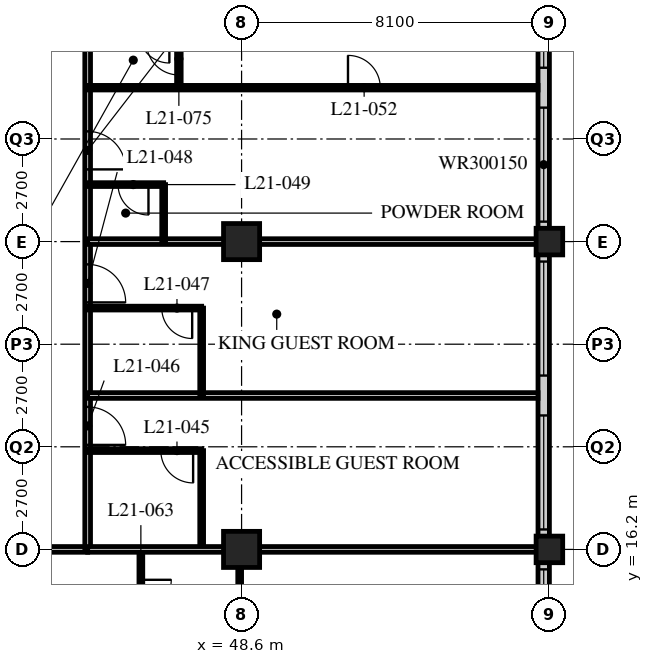
"""IFC4 building model, lengths in metres.
Left out: names, types, materials, properties, quantities, classifications, styles, units other than length and angle.
Written with IfcOpenShell. Run it as: python <this file> out.ifc"""

import sys

from ifc_helpers import new_model, si_unit, direction, frame, frame_2d, origin, origin_2d, place, context, subcontext, project, spatial, rectangle, hollow_rectangle, extrude, element, fill, save


model = new_model("IFC4")
c1 = context("Model", 3, precision=1e-05, world=origin(), true_north=direction((0.0, 1.0)))
c2 = subcontext(c1, "Body", "Model", "MODEL_VIEW")
j1 = project(units=[si_unit("LENGTHUNIT", "METRE"), si_unit("PLANEANGLEUNIT", "RADIAN")], contexts=[c1])
p1 = place(None, origin())
s1 = spatial("IfcSite", under=j1, at=p1, CompositionType="ELEMENT")
p2 = place(p1, origin())
s2 = spatial("IfcBuilding", under=s1, at=p2, CompositionType="ELEMENT")
p3 = place(p2, frame((0.0, 0.0, 84.0)))
s3 = spatial("IfcBuildingStorey", under=s2, at=p3, CompositionType="ELEMENT", Elevation=84.0)
for number, where, z_axis, x_axis in (
    (1, (48.6, 16.2, 0.0), (0.0, 0.0, 1.0), (1.0, 0.0, 0.0)),
    (2, (48.6, 24.3, 0.0), (0.0, 0.0, 1.0), (1.0, 0.0, 0.0)),
):
    element("IfcColumn", number, at=place(p3, frame(where, z_axis=z_axis, x_axis=x_axis)), inside=s3, PredefinedType="COLUMN", context=c2, shape_type="SweptSolid", body=[
        extrude(hollow_rectangle(XDim=0.95, YDim=0.95, WallThickness=0.095, at=origin_2d()), origin(), (0.0, 0.0, 1.0), 3.4),
    ])
for number, where, z_axis, x_axis in (
    (3, (56.7, 16.2, 0.0), (0.0, 0.0, 1.0), (1.0, 0.0, 0.0)),
    (4, (56.7, 24.3, 0.0), (0.0, 0.0, 1.0), (1.0, 0.0, 0.0)),
):
    element("IfcColumn", number, at=place(p3, frame(where, z_axis=z_axis, x_axis=x_axis)), inside=s3, PredefinedType="COLUMN", context=c2, shape_type="SweptSolid", body=[
        extrude(hollow_rectangle(XDim=0.7, YDim=0.7, WallThickness=0.06, at=origin_2d()), origin(), (0.0, 0.0, 1.0), 3.4),
    ])
p4 = place(p3, frame((56.55, 8.4, 0.0), z_axis=(0.0, 0.0, 1.0), x_axis=(0.0, 1.0, 0.0)))
e5 = element("IfcWall", 5, at=p4, inside=s3, PredefinedType="SOLIDWALL", context=c2, shape_type="SweptSolid", body=[
    extrude(rectangle(XDim=32.1, YDim=0.3, at=frame_2d((16.05, 0.0))), origin(), (0.0, 0.0, 1.0), 3.19),
])
p5 = place(p4, frame((0.225, 0.0, 0.9)))
e6 = element("IfcOpeningElement", 6, at=p5, cuts=e5, PredefinedType="OPENING", context=c2, shape_type="SweptSolid", body=[
    extrude(rectangle(XDim=3.0, YDim=1.5, at=frame_2d((1.5, 0.75))), frame((0.0, 0.16, 0.0), z_axis=(0.0, -1.0, 0.0), x_axis=(1.0, 0.0, 0.0)), (0.0, 0.0, 1.0), 0.32),
])
p6 = place(p4, frame((4.275, 0.0, 0.9)))
e7 = element("IfcOpeningElement", 7, at=p6, cuts=e5, PredefinedType="OPENING", context=c2, shape_type="SweptSolid", body=[
    extrude(rectangle(XDim=3.0, YDim=1.5, at=frame_2d((1.5, 0.75))), frame((0.0, 0.16, 0.0), z_axis=(0.0, -1.0, 0.0), x_axis=(1.0, 0.0, 0.0)), (0.0, 0.0, 1.0), 0.32),
])
p7 = place(p4, frame((8.325, 0.0, 0.9)))
e8 = element("IfcOpeningElement", 8, at=p7, cuts=e5, PredefinedType="OPENING", context=c2, shape_type="SweptSolid", body=[
    extrude(rectangle(XDim=3.0, YDim=1.5, at=frame_2d((1.5, 0.75))), frame((0.0, 0.16, 0.0), z_axis=(0.0, -1.0, 0.0), x_axis=(1.0, 0.0, 0.0)), (0.0, 0.0, 1.0), 0.32),
])
p8 = place(p4, frame((12.375, 0.0, 0.9)))
e9 = element("IfcOpeningElement", 9, at=p8, cuts=e5, PredefinedType="OPENING", context=c2, shape_type="SweptSolid", body=[
    extrude(rectangle(XDim=3.0, YDim=1.5, at=frame_2d((1.5, 0.75))), frame((0.0, 0.16, 0.0), z_axis=(0.0, -1.0, 0.0), x_axis=(1.0, 0.0, 0.0)), (0.0, 0.0, 1.0), 0.32),
])
p9 = place(p4, frame((16.425, 0.0, 0.9)))
e10 = element("IfcOpeningElement", 10, at=p9, cuts=e5, PredefinedType="OPENING", context=c2, shape_type="SweptSolid", body=[
    extrude(rectangle(XDim=3.0, YDim=1.5, at=frame_2d((1.5, 0.75))), frame((0.0, 0.16, 0.0), z_axis=(0.0, -1.0, 0.0), x_axis=(1.0, 0.0, 0.0)), (0.0, 0.0, 1.0), 0.32),
])
p10 = place(p4, frame((20.475, 0.0, 0.9)))
e11 = element("IfcOpeningElement", 11, at=p10, cuts=e5, PredefinedType="OPENING", context=c2, shape_type="SweptSolid", body=[
    extrude(rectangle(XDim=3.0, YDim=1.5, at=frame_2d((1.5, 0.75))), frame((0.0, 0.16, 0.0), z_axis=(0.0, -1.0, 0.0), x_axis=(1.0, 0.0, 0.0)), (0.0, 0.0, 1.0), 0.32),
])
p11 = place(p4, frame((24.525, 0.0, 0.9)))
e12 = element("IfcOpeningElement", 12, at=p11, cuts=e5, PredefinedType="OPENING", context=c2, shape_type="SweptSolid", body=[
    extrude(rectangle(XDim=3.0, YDim=1.5, at=frame_2d((1.5, 0.75))), frame((0.0, 0.16, 0.0), z_axis=(0.0, -1.0, 0.0), x_axis=(1.0, 0.0, 0.0)), (0.0, 0.0, 1.0), 0.32),
])
p12 = place(p4, frame((28.575, 0.0, 0.9)))
e13 = element("IfcOpeningElement", 13, at=p12, cuts=e5, PredefinedType="OPENING", context=c2, shape_type="SweptSolid", body=[
    extrude(rectangle(XDim=3.0, YDim=1.5, at=frame_2d((1.5, 0.75))), frame((0.0, 0.16, 0.0), z_axis=(0.0, -1.0, 0.0), x_axis=(1.0, 0.0, 0.0)), (0.0, 0.0, 1.0), 0.32),
])
p13 = place(p3, frame((12.15, 16.2, 0.0), z_axis=(0.0, 0.0, 1.0), x_axis=(1.0, 0.0, 0.0)))
e14 = element("IfcWall", 14, at=p13, inside=s3, PredefinedType="PARTITIONING", context=c2, shape_type="SweptSolid", body=[
    extrude(rectangle(XDim=32.4, YDim=0.15, at=frame_2d((16.2, 0.0))), origin(), (0.0, 0.0, 1.0), 2.428),
])
p14 = place(p13, frame((6.5, 0.0, 0.0)))
e15 = element("IfcOpeningElement", 15, at=p14, cuts=e14, PredefinedType="OPENING", context=c2, shape_type="SweptSolid", body=[
    extrude(rectangle(XDim=1.0, YDim=2.1, at=frame_2d((0.5, 1.05))), frame((0.0, 0.085, 0.0), z_axis=(0.0, -1.0, 0.0), x_axis=(1.0, 0.0, 0.0)), (0.0, 0.0, 1.0), 0.17),
])
p15 = place(p13, frame((8.4, 0.0, 0.0)))
e16 = element("IfcOpeningElement", 16, at=p15, cuts=e14, PredefinedType="OPENING", context=c2, shape_type="SweptSolid", body=[
    extrude(rectangle(XDim=1.0, YDim=2.1, at=frame_2d((0.5, 1.05))), frame((0.0, 0.085, 0.0), z_axis=(0.0, -1.0, 0.0), x_axis=(1.0, 0.0, 0.0)), (0.0, 0.0, 1.0), 0.17),
])
p16 = place(p13, frame((14.9, 0.0, 0.0)))
e17 = element("IfcOpeningElement", 17, at=p16, cuts=e14, PredefinedType="OPENING", context=c2, shape_type="SweptSolid", body=[
    extrude(rectangle(XDim=1.0, YDim=2.1, at=frame_2d((0.5, 1.05))), frame((0.0, 0.085, 0.0), z_axis=(0.0, -1.0, 0.0), x_axis=(1.0, 0.0, 0.0)), (0.0, 0.0, 1.0), 0.17),
])
p17 = place(p13, frame((16.5, 0.0, 0.0)))
e18 = element("IfcOpeningElement", 18, at=p17, cuts=e14, PredefinedType="OPENING", context=c2, shape_type="SweptSolid", body=[
    extrude(rectangle(XDim=1.0, YDim=2.1, at=frame_2d((0.5, 1.05))), frame((0.0, 0.085, 0.0), z_axis=(0.0, -1.0, 0.0), x_axis=(1.0, 0.0, 0.0)), (0.0, 0.0, 1.0), 0.17),
])
p18 = place(p13, frame((23.0, 0.0, 0.0)))
e19 = element("IfcOpeningElement", 19, at=p18, cuts=e14, PredefinedType="OPENING", context=c2, shape_type="SweptSolid", body=[
    extrude(rectangle(XDim=1.0, YDim=2.1, at=frame_2d((0.5, 1.05))), frame((0.0, 0.085, 0.0), z_axis=(0.0, -1.0, 0.0), x_axis=(1.0, 0.0, 0.0)), (0.0, 0.0, 1.0), 0.17),
])
p19 = place(p13, frame((24.9, 0.0, 0.0)))
e20 = element("IfcOpeningElement", 20, at=p19, cuts=e14, PredefinedType="OPENING", context=c2, shape_type="SweptSolid", body=[
    extrude(rectangle(XDim=1.0, YDim=2.1, at=frame_2d((0.5, 1.05))), frame((0.0, 0.085, 0.0), z_axis=(0.0, -1.0, 0.0), x_axis=(1.0, 0.0, 0.0)), (0.0, 0.0, 1.0), 0.17),
])
p20 = place(p13, frame((1.525, 0.0, 0.0)))
e21 = element("IfcOpeningElement", 21, at=p20, cuts=e14, PredefinedType="OPENING", context=c2, shape_type="SweptSolid", body=[
    extrude(rectangle(XDim=1.0, YDim=2.1, at=frame_2d((0.5, 1.05))), frame((0.0, 0.085, 0.0), z_axis=(0.0, -1.0, 0.0), x_axis=(1.0, 0.0, 0.0)), (0.0, 0.0, 1.0), 0.17),
])
p21 = place(p13, frame((29.875, 0.0, 0.0)))
e22 = element("IfcOpeningElement", 22, at=p21, cuts=e14, PredefinedType="OPENING", context=c2, shape_type="SweptSolid", body=[
    extrude(rectangle(XDim=1.0, YDim=2.1, at=frame_2d((0.5, 1.05))), frame((0.0, 0.085, 0.0), z_axis=(0.0, -1.0, 0.0), x_axis=(1.0, 0.0, 0.0)), (0.0, 0.0, 1.0), 0.17),
])
p22 = place(p3, frame((44.55, 16.2, 0.0), z_axis=(0.0, 0.0, 1.0), x_axis=(0.0, 1.0, 0.0)))
e23 = element("IfcWall", 23, at=p22, inside=s3, PredefinedType="PARTITIONING", context=c2, shape_type="SweptSolid", body=[
    extrude(rectangle(XDim=26.1, YDim=0.15, at=frame_2d((13.05, 0.0))), origin(), (0.0, 0.0, 1.0), 3.19),
])
p23 = place(p22, frame((2.75, 0.0, 0.0)))
e24 = element("IfcOpeningElement", 24, at=p23, cuts=e23, PredefinedType="OPENING", context=c2, shape_type="SweptSolid", body=[
    extrude(rectangle(XDim=1.0, YDim=2.1, at=frame_2d((0.5, 1.05))), frame((0.0, 0.085, 0.0), z_axis=(0.0, -1.0, 0.0), x_axis=(1.0, 0.0, 0.0)), (0.0, 0.0, 1.0), 0.17),
])
p24 = place(p22, frame((6.5, 0.0, 0.0)))
e25 = element("IfcOpeningElement", 25, at=p24, cuts=e23, PredefinedType="OPENING", context=c2, shape_type="SweptSolid", body=[
    extrude(rectangle(XDim=1.0, YDim=2.1, at=frame_2d((0.5, 1.05))), frame((0.0, 0.085, 0.0), z_axis=(0.0, -1.0, 0.0), x_axis=(1.0, 0.0, 0.0)), (0.0, 0.0, 1.0), 0.17),
])
p25 = place(p22, frame((10.0, 0.0, 0.0)))
e26 = element("IfcOpeningElement", 26, at=p25, cuts=e23, PredefinedType="OPENING", context=c2, shape_type="SweptSolid", body=[
    extrude(rectangle(XDim=1.0, YDim=2.1, at=frame_2d((0.5, 1.05))), frame((0.0, 0.085, 0.0), z_axis=(0.0, -1.0, 0.0), x_axis=(1.0, 0.0, 0.0)), (0.0, 0.0, 1.0), 0.17),
])
p26 = place(p22, frame((18.1, 0.0, 0.0)))
e27 = element("IfcOpeningElement", 27, at=p26, cuts=e23, PredefinedType="OPENING", context=c2, shape_type="SweptSolid", body=[
    extrude(rectangle(XDim=1.0, YDim=2.1, at=frame_2d((0.5, 1.05))), frame((0.0, 0.085, 0.0), z_axis=(0.0, -1.0, 0.0), x_axis=(1.0, 0.0, 0.0)), (0.0, 0.0, 1.0), 0.17),
])
p27 = place(p3, frame((47.55, 16.2, 0.0), z_axis=(0.0, 0.0, 1.0), x_axis=(0.0, 1.0, 0.0)))
e28 = element("IfcWall", 28, at=p27, inside=s3, PredefinedType="PARTITIONING", context=c2, shape_type="SweptSolid", body=[
    extrude(rectangle(XDim=2.6, YDim=0.1, at=frame_2d((1.3, 0.0))), origin(), (0.0, 0.0, 1.0), 3.19),
])
p28 = place(p3, frame((44.55, 18.8, 0.0), z_axis=(0.0, 0.0, 1.0), x_axis=(1.0, 0.0, 0.0)))
e29 = element("IfcWall", 29, at=p28, inside=s3, PredefinedType="PARTITIONING", context=c2, shape_type="SweptSolid", body=[
    extrude(rectangle(XDim=3.0, YDim=0.1, at=frame_2d((1.5, 0.0))), origin(), (0.0, 0.0, 1.0), 3.19),
])
p29 = place(p28, frame((1.925, 0.0, 0.0)))
e30 = element("IfcOpeningElement", 30, at=p29, cuts=e29, PredefinedType="OPENING", context=c2, shape_type="SweptSolid", body=[
    extrude(rectangle(XDim=0.85, YDim=2.1, at=frame_2d((0.425, 1.05))), frame((0.0, 0.06, 0.0), z_axis=(0.0, -1.0, 0.0), x_axis=(1.0, 0.0, 0.0)), (0.0, 0.0, 1.0), 0.12),
])
p30 = place(p3, frame((44.55, 20.25, 0.0), z_axis=(0.0, 0.0, 1.0), x_axis=(1.0, 0.0, 0.0)))
e31 = element("IfcWall", 31, at=p30, inside=s3, PredefinedType="PARTITIONING", context=c2, shape_type="SweptSolid", body=[
    extrude(rectangle(XDim=11.85, YDim=0.15, at=frame_2d((5.925, 0.0))), origin(), (0.0, 0.0, 1.0), 3.19),
])
p31 = place(p3, frame((47.55, 20.25, 0.0), z_axis=(0.0, 0.0, 1.0), x_axis=(0.0, 1.0, 0.0)))
e32 = element("IfcWall", 32, at=p31, inside=s3, PredefinedType="PARTITIONING", context=c2, shape_type="SweptSolid", body=[
    extrude(rectangle(XDim=2.3, YDim=0.1, at=frame_2d((1.15, 0.0))), origin(), (0.0, 0.0, 1.0), 3.19),
])
p32 = place(p3, frame((44.55, 22.55, 0.0), z_axis=(0.0, 0.0, 1.0), x_axis=(1.0, 0.0, 0.0)))
e33 = element("IfcWall", 33, at=p32, inside=s3, PredefinedType="PARTITIONING", context=c2, shape_type="SweptSolid", body=[
    extrude(rectangle(XDim=3.0, YDim=0.1, at=frame_2d((1.5, 0.0))), origin(), (0.0, 0.0, 1.0), 3.19),
])
p33 = place(p32, frame((1.95, 0.0, 0.0)))
e34 = element("IfcOpeningElement", 34, at=p33, cuts=e33, PredefinedType="OPENING", context=c2, shape_type="SweptSolid", body=[
    extrude(rectangle(XDim=0.8, YDim=2.1, at=frame_2d((0.4, 1.05))), frame((0.0, 0.06, 0.0), z_axis=(0.0, -1.0, 0.0), x_axis=(1.0, 0.0, 0.0)), (0.0, 0.0, 1.0), 0.12),
])
p34 = place(p3, frame((44.55, 24.3, 0.0), z_axis=(0.0, 0.0, 1.0), x_axis=(1.0, 0.0, 0.0)))
e35 = element("IfcWall", 35, at=p34, inside=s3, PredefinedType="PARTITIONING", context=c2, shape_type="SweptSolid", body=[
    extrude(rectangle(XDim=11.85, YDim=0.15, at=frame_2d((5.925, 0.0))), origin(), (0.0, 0.0, 1.0), 2.428),
])
p35 = place(p3, frame((46.55, 24.3, 0.0), z_axis=(0.0, 0.0, 1.0), x_axis=(0.0, 1.0, 0.0)))
e36 = element("IfcWall", 36, at=p35, inside=s3, PredefinedType="PARTITIONING", context=c2, shape_type="SweptSolid", body=[
    extrude(rectangle(XDim=1.5, YDim=0.1, at=frame_2d((0.75, 0.0))), origin(), (0.0, 0.0, 1.0), 3.19),
])
p36 = place(p3, frame((44.55, 25.8, 0.0), z_axis=(0.0, 0.0, 1.0), x_axis=(1.0, 0.0, 0.0)))
e37 = element("IfcWall", 37, at=p36, inside=s3, PredefinedType="PARTITIONING", context=c2, shape_type="SweptSolid", body=[
    extrude(rectangle(XDim=2.0, YDim=0.1, at=frame_2d((1.0, 0.0))), origin(), (0.0, 0.0, 1.0), 3.19),
])
p37 = place(p36, frame((0.8, 0.0, 0.0)))
e38 = element("IfcOpeningElement", 38, at=p37, cuts=e37, PredefinedType="OPENING", context=c2, shape_type="SweptSolid", body=[
    extrude(rectangle(XDim=0.8, YDim=2.1, at=frame_2d((0.4, 1.05))), frame((0.0, 0.06, 0.0), z_axis=(0.0, -1.0, 0.0), x_axis=(1.0, 0.0, 0.0)), (0.0, 0.0, 1.0), 0.12),
])
p38 = place(p3, frame((44.55, 28.35, 0.0), z_axis=(0.0, 0.0, 1.0), x_axis=(1.0, 0.0, 0.0)))
e39 = element("IfcWall", 39, at=p38, inside=s3, PredefinedType="PARTITIONING", context=c2, shape_type="SweptSolid", body=[
    extrude(rectangle(XDim=11.85, YDim=0.12, at=frame_2d((5.925, 0.0))), origin(), (0.0, 0.0, 1.0), 3.19),
])
p39 = place(p38, frame((6.85, 0.0, 0.0)))
e40 = element("IfcOpeningElement", 40, at=p39, cuts=e39, PredefinedType="OPENING", context=c2, shape_type="SweptSolid", body=[
    extrude(rectangle(XDim=0.85, YDim=2.1, at=frame_2d((0.425, 1.05))), frame((0.0, 0.07, 0.0), z_axis=(0.0, -1.0, 0.0), x_axis=(1.0, 0.0, 0.0)), (0.0, 0.0, 1.0), 0.14),
])
p40 = place(p3, frame((45.95, 16.2, 0.0), z_axis=(0.0, 0.0, 1.0), x_axis=(0.0, -1.0, 0.0)))
e41 = element("IfcWall", 41, at=p40, inside=s3, PredefinedType="PARTITIONING", context=c2, shape_type="SweptSolid", body=[
    extrude(rectangle(XDim=2.4, YDim=0.1, at=frame_2d((1.2, 0.0))), origin(), (0.0, 0.0, 1.0), 3.19),
])
p41 = place(p40, frame((0.8, 0.0, 0.0)))
e42 = element("IfcOpeningElement", 42, at=p41, cuts=e41, PredefinedType="OPENING", context=c2, shape_type="SweptSolid", body=[
    extrude(rectangle(XDim=0.8, YDim=2.1, at=frame_2d((0.4, 1.05))), frame((0.0, 0.06, 0.0), z_axis=(0.0, -1.0, 0.0), x_axis=(1.0, 0.0, 0.0)), (0.0, 0.0, 1.0), 0.12),
])
p42 = place(p3, frame((48.55, 16.2, 0.0), z_axis=(0.0, 0.0, 1.0), x_axis=(0.0, -1.0, 0.0)))
e43 = element("IfcWall", 43, at=p42, inside=s3, PredefinedType="PARTITIONING", context=c2, shape_type="SweptSolid", body=[
    extrude(rectangle(XDim=2.4, YDim=0.1, at=frame_2d((1.2, 0.0))), origin(), (0.0, 0.0, 1.0), 2.428),
])
p43 = place(p3, frame((44.55, 16.2, 0.0), z_axis=(0.0, 0.0, 1.0), x_axis=(1.0, 0.0, 0.0)))
e44 = element("IfcWall", 44, at=p43, inside=s3, PredefinedType="PARTITIONING", context=c2, shape_type="SweptSolid", body=[
    extrude(rectangle(XDim=11.85, YDim=0.15, at=frame_2d((5.925, 0.0))), origin(), (0.0, 0.0, 1.0), 2.428),
])
p44 = place(p3, frame((46.95, 29.81, 0.0), z_axis=(0.0, 0.0, 1.0), x_axis=(0.0, -1.0, 0.0)))
e45 = element("IfcWall", 45, at=p44, inside=s3, PredefinedType="PARTITIONING", context=c2, shape_type="SweptSolid", body=[
    extrude(rectangle(XDim=1.46, YDim=0.12, at=frame_2d((0.73, 0.0))), origin(), (0.0, 0.0, 1.0), 3.19),
])
p45 = place(p44, frame((0.275, 0.0, 0.0)))
e46 = element("IfcOpeningElement", 46, at=p45, cuts=e45, PredefinedType="OPENING", context=c2, shape_type="SweptSolid", body=[
    extrude(rectangle(XDim=0.85, YDim=2.1, at=frame_2d((0.425, 1.05))), frame((0.0, 0.07, 0.0), z_axis=(0.0, -1.0, 0.0), x_axis=(1.0, 0.0, 0.0)), (0.0, 0.0, 1.0), 0.14),
])
p46 = place(p6, origin())
e47 = element("IfcWindow", 47, at=p46, inside=s3, PartitioningType="SINGLE_PANEL", PredefinedType="WINDOW", context=c2, shape_type="SweptSolid", body=[
    extrude(rectangle(XDim=3.0, YDim=1.5, at=frame_2d((1.5, 0.75))), frame((0.0, 0.03, 0.0), z_axis=(0.0, -1.0, 0.0), x_axis=(1.0, 0.0, 0.0)), (0.0, 0.0, 1.0), 0.06),
])
fill(e7, e47)
p47 = place(p7, origin())
e48 = element("IfcWindow", 48, at=p47, inside=s3, PartitioningType="SINGLE_PANEL", PredefinedType="WINDOW", context=c2, shape_type="SweptSolid", body=[
    extrude(rectangle(XDim=3.0, YDim=1.5, at=frame_2d((1.5, 0.75))), frame((0.0, 0.03, 0.0), z_axis=(0.0, -1.0, 0.0), x_axis=(1.0, 0.0, 0.0)), (0.0, 0.0, 1.0), 0.06),
])
fill(e8, e48)
p48 = place(p8, origin())
e49 = element("IfcWindow", 49, at=p48, inside=s3, PartitioningType="SINGLE_PANEL", PredefinedType="WINDOW", context=c2, shape_type="SweptSolid", body=[
    extrude(rectangle(XDim=3.0, YDim=1.5, at=frame_2d((1.5, 0.75))), frame((0.0, 0.03, 0.0), z_axis=(0.0, -1.0, 0.0), x_axis=(1.0, 0.0, 0.0)), (0.0, 0.0, 1.0), 0.06),
])
fill(e9, e49)
p49 = place(p9, origin())
e50 = element("IfcWindow", 50, at=p49, inside=s3, PartitioningType="SINGLE_PANEL", PredefinedType="WINDOW", context=c2, shape_type="SweptSolid", body=[
    extrude(rectangle(XDim=3.0, YDim=1.5, at=frame_2d((1.5, 0.75))), frame((0.0, 0.03, 0.0), z_axis=(0.0, -1.0, 0.0), x_axis=(1.0, 0.0, 0.0)), (0.0, 0.0, 1.0), 0.06),
])
fill(e10, e50)
p50 = place(p10, origin())
e51 = element("IfcWindow", 51, at=p50, inside=s3, PartitioningType="SINGLE_PANEL", PredefinedType="WINDOW", context=c2, shape_type="SweptSolid", body=[
    extrude(rectangle(XDim=3.0, YDim=1.5, at=frame_2d((1.5, 0.75))), frame((0.0, 0.03, 0.0), z_axis=(0.0, -1.0, 0.0), x_axis=(1.0, 0.0, 0.0)), (0.0, 0.0, 1.0), 0.06),
])
fill(e11, e51)
p51 = place(p29, origin())
e52 = element("IfcDoor", 52, at=p51, inside=s3, OperationType="SINGLE_SWING_LEFT", PredefinedType="DOOR", context=c2, shape_type="SweptSolid", body=[
    extrude(rectangle(XDim=0.85, YDim=2.1, at=frame_2d((0.425, 1.05))), frame((0.0, 0.025, 0.0), z_axis=(0.0, -1.0, 0.0), x_axis=(1.0, 0.0, 0.0)), (0.0, 0.0, 1.0), 0.05),
])
fill(e30, e52)
p52 = place(p23, origin())
e53 = element("IfcDoor", 53, at=p52, inside=s3, OperationType="SINGLE_SWING_RIGHT", PredefinedType="DOOR", context=c2, shape_type="SweptSolid", body=[
    extrude(rectangle(XDim=1.0, YDim=2.1, at=frame_2d((0.5, 1.05))), frame((0.0, 0.025, 0.0), z_axis=(0.0, -1.0, 0.0), x_axis=(1.0, 0.0, 0.0)), (0.0, 0.0, 1.0), 0.05),
])
fill(e24, e53)
p53 = place(p33, origin())
e54 = element("IfcDoor", 54, at=p53, inside=s3, OperationType="SINGLE_SWING_LEFT", PredefinedType="DOOR", context=c2, shape_type="SweptSolid", body=[
    extrude(rectangle(XDim=0.8, YDim=2.1, at=frame_2d((0.4, 1.05))), frame((0.0, 0.025, 0.0), z_axis=(0.0, -1.0, 0.0), x_axis=(1.0, 0.0, 0.0)), (0.0, 0.0, 1.0), 0.05),
])
fill(e34, e54)
p54 = place(p24, origin())
e55 = element("IfcDoor", 55, at=p54, inside=s3, OperationType="SINGLE_SWING_RIGHT", PredefinedType="DOOR", context=c2, shape_type="SweptSolid", body=[
    extrude(rectangle(XDim=1.0, YDim=2.1, at=frame_2d((0.5, 1.05))), frame((0.0, 0.025, 0.0), z_axis=(0.0, -1.0, 0.0), x_axis=(1.0, 0.0, 0.0)), (0.0, 0.0, 1.0), 0.05),
])
fill(e25, e55)
p55 = place(p37, origin())
e56 = element("IfcDoor", 56, at=p55, inside=s3, OperationType="SINGLE_SWING_LEFT", PredefinedType="DOOR", context=c2, shape_type="SweptSolid", body=[
    extrude(rectangle(XDim=0.8, YDim=2.1, at=frame_2d((0.4, 1.05))), frame((0.0, 0.025, 0.0), z_axis=(0.0, -1.0, 0.0), x_axis=(1.0, 0.0, 0.0)), (0.0, 0.0, 1.0), 0.05),
])
fill(e38, e56)
p56 = place(p25, origin())
e57 = element("IfcDoor", 57, at=p56, inside=s3, OperationType="SINGLE_SWING_RIGHT", PredefinedType="DOOR", context=c2, shape_type="SweptSolid", body=[
    extrude(rectangle(XDim=1.0, YDim=2.1, at=frame_2d((0.5, 1.05))), frame((0.0, 0.025, 0.0), z_axis=(0.0, -1.0, 0.0), x_axis=(1.0, 0.0, 0.0)), (0.0, 0.0, 1.0), 0.05),
])
fill(e26, e57)
p57 = place(p39, origin())
e58 = element("IfcDoor", 58, at=p57, inside=s3, OperationType="SINGLE_SWING_LEFT", PredefinedType="DOOR", context=c2, shape_type="SweptSolid", body=[
    extrude(rectangle(XDim=0.85, YDim=2.1, at=frame_2d((0.425, 1.05))), frame((0.0, 0.025, 0.0), z_axis=(0.0, -1.0, 0.0), x_axis=(1.0, 0.0, 0.0)), (0.0, 0.0, 1.0), 0.05),
])
fill(e40, e58)
p58 = place(p41, origin())
e59 = element("IfcDoor", 59, at=p58, inside=s3, OperationType="SINGLE_SWING_LEFT", PredefinedType="DOOR", context=c2, shape_type="SweptSolid", body=[
    extrude(rectangle(XDim=0.8, YDim=2.1, at=frame_2d((0.4, 1.05))), frame((0.0, 0.025, 0.0), z_axis=(0.0, -1.0, 0.0), x_axis=(1.0, 0.0, 0.0)), (0.0, 0.0, 1.0), 0.05),
])
fill(e42, e59)
p59 = place(p45, origin())
e60 = element("IfcDoor", 60, at=p59, inside=s3, OperationType="SINGLE_SWING_RIGHT", PredefinedType="DOOR", context=c2, shape_type="SweptSolid", body=[
    extrude(rectangle(XDim=0.85, YDim=2.1, at=frame_2d((0.425, 1.05))), frame((0.0, 0.025, 0.0), z_axis=(0.0, -1.0, 0.0), x_axis=(1.0, 0.0, 0.0)), (0.0, 0.0, 1.0), 0.05),
])
fill(e46, e60)
save(model, sys.argv[1])
